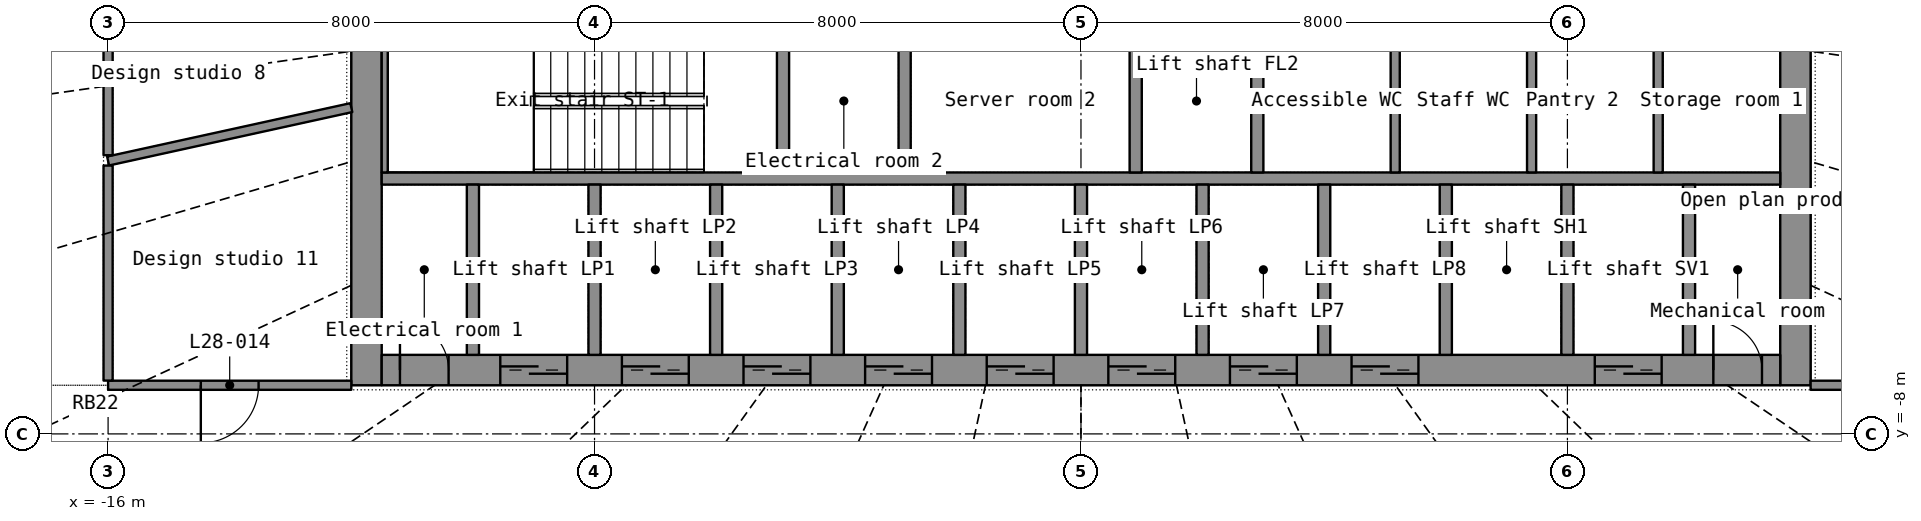
"""IFC4 building model, lengths in metres.
Left out: names, types, materials, properties, quantities, classifications, styles, units other than length and angle.
Written with IfcOpenShell. Run it as: python <this file> out.ifc"""

import sys

from ifc_helpers import new_model, si_unit, direction, frame, frame_2d, origin, place, context, subcontext, project, spatial, rectangle, extrude, element, fill, save


model = new_model("IFC4")
c1 = context("Model", 3, precision=1e-05, world=origin(), true_north=direction((0.0, 1.0)))
c2 = subcontext(c1, "Body", "Model", "MODEL_VIEW")
j1 = project(units=[si_unit("LENGTHUNIT", "METRE"), si_unit("PLANEANGLEUNIT", "RADIAN")], contexts=[c1])
p1 = place(None, origin())
s1 = spatial("IfcSite", under=j1, at=p1, CompositionType="ELEMENT")
p2 = place(p1, origin())
s2 = spatial("IfcBuilding", under=s1, at=p2, CompositionType="ELEMENT")
p3 = place(p2, frame((0.0, 0.0, 119.3)))
s3 = spatial("IfcBuildingStorey", under=s2, at=p3, CompositionType="ELEMENT", Elevation=119.3)
p4 = place(p3, frame((-11.75, -7.2, 0.0), z_axis=(0.0, 0.0, 1.0), x_axis=(0.0, 1.0, 0.0)))
e1 = element("IfcWall", 1, at=p4, inside=s3, PredefinedType="SHEAR", context=c2, shape_type="SweptSolid", body=[
    extrude(rectangle(XDim=14.4, YDim=0.5, at=frame_2d((7.2, 0.0))), origin(), (0.0, 0.0, 1.0), 3.3),
])
p5 = place(p4, frame((6.5, 0.0, 0.0)))
e2 = element("IfcOpeningElement", 2, at=p5, cuts=e1, PredefinedType="OPENING", context=c2, shape_type="SweptSolid", body=[
    extrude(rectangle(XDim=1.4, YDim=2.2, at=frame_2d((0.7, 1.1))), frame((0.0, 0.26, 0.0), z_axis=(0.0, -1.0, 0.0), x_axis=(1.0, 0.0, 0.0)), (0.0, 0.0, 1.0), 0.52),
])
p6 = place(p3, frame((11.75, -7.2, 0.0), z_axis=(0.0, 0.0, 1.0), x_axis=(0.0, 1.0, 0.0)))
e3 = element("IfcWall", 3, at=p6, inside=s3, PredefinedType="SHEAR", context=c2, shape_type="SweptSolid", body=[
    extrude(rectangle(XDim=14.4, YDim=0.5, at=frame_2d((7.2, 0.0))), origin(), (0.0, 0.0, 1.0), 3.3),
])
p7 = place(p6, frame((6.5, 0.0, 0.0)))
e4 = element("IfcOpeningElement", 4, at=p7, cuts=e3, PredefinedType="OPENING", context=c2, shape_type="SweptSolid", body=[
    extrude(rectangle(XDim=1.4, YDim=2.2, at=frame_2d((0.7, 1.1))), frame((0.0, 0.26, 0.0), z_axis=(0.0, -1.0, 0.0), x_axis=(1.0, 0.0, 0.0)), (0.0, 0.0, 1.0), 0.52),
])
p8 = place(p3, frame((-11.5, -6.95, 0.0), z_axis=(0.0, 0.0, 1.0), x_axis=(1.0, 0.0, 0.0)))
e5 = element("IfcWall", 5, at=p8, inside=s3, PredefinedType="SHEAR", context=c2, shape_type="SweptSolid", body=[
    extrude(rectangle(XDim=23.0, YDim=0.5, at=frame_2d((11.5, 0.0))), origin(), (0.0, 0.0, 1.0), 3.3),
])
p9 = place(p8, frame((1.95, 0.0, 0.0)))
e6 = element("IfcOpeningElement", 6, at=p9, cuts=e5, PredefinedType="OPENING", context=c2, shape_type="SweptSolid", body=[
    extrude(rectangle(XDim=1.1, YDim=2.2, at=frame_2d((0.55, 1.1))), frame((0.0, 0.26, 0.0), z_axis=(0.0, -1.0, 0.0), x_axis=(1.0, 0.0, 0.0)), (0.0, 0.0, 1.0), 0.52),
])
p10 = place(p8, frame((3.95, 0.0, 0.0)))
e7 = element("IfcOpeningElement", 7, at=p10, cuts=e5, PredefinedType="OPENING", context=c2, shape_type="SweptSolid", body=[
    extrude(rectangle(XDim=1.1, YDim=2.2, at=frame_2d((0.55, 1.1))), frame((0.0, 0.26, 0.0), z_axis=(0.0, -1.0, 0.0), x_axis=(1.0, 0.0, 0.0)), (0.0, 0.0, 1.0), 0.52),
])
p11 = place(p8, frame((5.95, 0.0, 0.0)))
e8 = element("IfcOpeningElement", 8, at=p11, cuts=e5, PredefinedType="OPENING", context=c2, shape_type="SweptSolid", body=[
    extrude(rectangle(XDim=1.1, YDim=2.2, at=frame_2d((0.55, 1.1))), frame((0.0, 0.26, 0.0), z_axis=(0.0, -1.0, 0.0), x_axis=(1.0, 0.0, 0.0)), (0.0, 0.0, 1.0), 0.52),
])
p12 = place(p8, frame((7.95, 0.0, 0.0)))
e9 = element("IfcOpeningElement", 9, at=p12, cuts=e5, PredefinedType="OPENING", context=c2, shape_type="SweptSolid", body=[
    extrude(rectangle(XDim=1.1, YDim=2.2, at=frame_2d((0.55, 1.1))), frame((0.0, 0.26, 0.0), z_axis=(0.0, -1.0, 0.0), x_axis=(1.0, 0.0, 0.0)), (0.0, 0.0, 1.0), 0.52),
])
p13 = place(p8, frame((9.95, 0.0, 0.0)))
e10 = element("IfcOpeningElement", 10, at=p13, cuts=e5, PredefinedType="OPENING", context=c2, shape_type="SweptSolid", body=[
    extrude(rectangle(XDim=1.1, YDim=2.2, at=frame_2d((0.55, 1.1))), frame((0.0, 0.26, 0.0), z_axis=(0.0, -1.0, 0.0), x_axis=(1.0, 0.0, 0.0)), (0.0, 0.0, 1.0), 0.52),
])
p14 = place(p8, frame((11.95, 0.0, 0.0)))
e11 = element("IfcOpeningElement", 11, at=p14, cuts=e5, PredefinedType="OPENING", context=c2, shape_type="SweptSolid", body=[
    extrude(rectangle(XDim=1.1, YDim=2.2, at=frame_2d((0.55, 1.1))), frame((0.0, 0.26, 0.0), z_axis=(0.0, -1.0, 0.0), x_axis=(1.0, 0.0, 0.0)), (0.0, 0.0, 1.0), 0.52),
])
p15 = place(p8, frame((13.95, 0.0, 0.0)))
e12 = element("IfcOpeningElement", 12, at=p15, cuts=e5, PredefinedType="OPENING", context=c2, shape_type="SweptSolid", body=[
    extrude(rectangle(XDim=1.1, YDim=2.2, at=frame_2d((0.55, 1.1))), frame((0.0, 0.26, 0.0), z_axis=(0.0, -1.0, 0.0), x_axis=(1.0, 0.0, 0.0)), (0.0, 0.0, 1.0), 0.52),
])
p16 = place(p8, frame((15.95, 0.0, 0.0)))
e13 = element("IfcOpeningElement", 13, at=p16, cuts=e5, PredefinedType="OPENING", context=c2, shape_type="SweptSolid", body=[
    extrude(rectangle(XDim=1.1, YDim=2.2, at=frame_2d((0.55, 1.1))), frame((0.0, 0.26, 0.0), z_axis=(0.0, -1.0, 0.0), x_axis=(1.0, 0.0, 0.0)), (0.0, 0.0, 1.0), 0.52),
])
p17 = place(p8, frame((19.95, 0.0, 0.0)))
e14 = element("IfcOpeningElement", 14, at=p17, cuts=e5, PredefinedType="OPENING", context=c2, shape_type="SweptSolid", body=[
    extrude(rectangle(XDim=1.1, YDim=2.2, at=frame_2d((0.55, 1.1))), frame((0.0, 0.26, 0.0), z_axis=(0.0, -1.0, 0.0), x_axis=(1.0, 0.0, 0.0)), (0.0, 0.0, 1.0), 0.52),
])
p18 = place(p8, frame((0.3, 0.0, 0.0)))
e15 = element("IfcOpeningElement", 15, at=p18, cuts=e5, PredefinedType="OPENING", context=c2, shape_type="SweptSolid", body=[
    extrude(rectangle(XDim=0.8, YDim=2.05, at=frame_2d((0.4, 1.025))), frame((0.0, 0.26, 0.0), z_axis=(0.0, -1.0, 0.0), x_axis=(1.0, 0.0, 0.0)), (0.0, 0.0, 1.0), 0.52),
])
p19 = place(p8, frame((21.9, 0.0, 0.0)))
e16 = element("IfcOpeningElement", 16, at=p19, cuts=e5, PredefinedType="OPENING", context=c2, shape_type="SweptSolid", body=[
    extrude(rectangle(XDim=0.8, YDim=2.05, at=frame_2d((0.4, 1.025))), frame((0.0, 0.26, 0.0), z_axis=(0.0, -1.0, 0.0), x_axis=(1.0, 0.0, 0.0)), (0.0, 0.0, 1.0), 0.52),
])
p20 = place(p3, frame((-11.5, -3.8, 0.0), z_axis=(0.0, 0.0, 1.0), x_axis=(1.0, 0.0, 0.0)))
e17 = element("IfcWall", 17, at=p20, inside=s3, PredefinedType="SHEAR", context=c2, shape_type="SweptSolid", body=[
    extrude(rectangle(XDim=23.0, YDim=0.2, at=frame_2d((11.5, 0.0))), origin(), (0.0, 0.0, 1.0), 3.3),
])
for number, where, z_axis, x_axis in (
    (18, (-10.0, -6.7, 0.0), (0.0, 0.0, 1.0), (0.0, 1.0, 0.0)),
    (19, (-8.0, -6.7, 0.0), (0.0, 0.0, 1.0), (0.0, 1.0, 0.0)),
    (20, (-6.0, -6.7, 0.0), (0.0, 0.0, 1.0), (0.0, 1.0, 0.0)),
    (21, (-4.0, -6.7, 0.0), (0.0, 0.0, 1.0), (0.0, 1.0, 0.0)),
    (22, (-2.0, -6.7, 0.0), (0.0, 0.0, 1.0), (0.0, 1.0, 0.0)),
    (23, (0.0, -6.7, 0.0), (0.0, 0.0, 1.0), (0.0, 1.0, 0.0)),
    (24, (2.0, -6.7, 0.0), (0.0, 0.0, 1.0), (0.0, 1.0, 0.0)),
    (25, (4.0, -6.7, 0.0), (0.0, 0.0, 1.0), (0.0, 1.0, 0.0)),
    (26, (6.0, -6.7, 0.0), (0.0, 0.0, 1.0), (0.0, 1.0, 0.0)),
    (27, (8.0, -6.7, 0.0), (0.0, 0.0, 1.0), (0.0, 1.0, 0.0)),
    (28, (10.0, -6.7, 0.0), (0.0, 0.0, 1.0), (0.0, 1.0, 0.0)),
):
    element("IfcWall", number, at=place(p3, frame(where, z_axis=z_axis, x_axis=x_axis)), inside=s3, PredefinedType="SHEAR", context=c2, shape_type="SweptSolid", body=[
        extrude(rectangle(XDim=2.8, YDim=0.2, at=frame_2d((1.4, 0.0))), origin(), (0.0, 0.0, 1.0), 3.3),
    ])
p21 = place(p3, frame((-2.9, -3.7, 0.0), z_axis=(0.0, 0.0, 1.0), x_axis=(0.0, 1.0, 0.0)))
e29 = element("IfcWall", 29, at=p21, inside=s3, PredefinedType="SHEAR", context=c2, shape_type="SweptSolid", body=[
    extrude(rectangle(XDim=7.4, YDim=0.2, at=frame_2d((3.7, 0.0))), origin(), (0.0, 0.0, 1.0), 3.3),
])
p22 = place(p21, frame((3.1, 0.0, 0.0)))
e30 = element("IfcOpeningElement", 30, at=p22, cuts=e29, PredefinedType="OPENING", context=c2, shape_type="SweptSolid", body=[
    extrude(rectangle(XDim=1.2, YDim=2.2, at=frame_2d((0.6, 1.1))), frame((0.0, 0.11, 0.0), z_axis=(0.0, -1.0, 0.0), x_axis=(1.0, 0.0, 0.0)), (0.0, 0.0, 1.0), 0.22),
])
p23 = place(p3, frame((2.9, -3.7, 0.0), z_axis=(0.0, 0.0, 1.0), x_axis=(0.0, 1.0, 0.0)))
e31 = element("IfcWall", 31, at=p23, inside=s3, PredefinedType="SHEAR", context=c2, shape_type="SweptSolid", body=[
    extrude(rectangle(XDim=7.4, YDim=0.2, at=frame_2d((3.7, 0.0))), origin(), (0.0, 0.0, 1.0), 3.3),
])
p24 = place(p23, frame((3.1, 0.0, 0.0)))
e32 = element("IfcOpeningElement", 32, at=p24, cuts=e31, PredefinedType="OPENING", context=c2, shape_type="SweptSolid", body=[
    extrude(rectangle(XDim=1.2, YDim=2.2, at=frame_2d((0.6, 1.1))), frame((0.0, 0.11, 0.0), z_axis=(0.0, -1.0, 0.0), x_axis=(1.0, 0.0, 0.0)), (0.0, 0.0, 1.0), 0.22),
])
p25 = place(p3, frame((0.9, -3.7, 0.0), z_axis=(0.0, 0.0, 1.0), x_axis=(0.0, 1.0, 0.0)))
e33 = element("IfcWall", 33, at=p25, inside=s3, PredefinedType="SHEAR", context=c2, shape_type="SweptSolid", body=[
    extrude(rectangle(XDim=2.35, YDim=0.2, at=frame_2d((1.175, 0.0))), origin(), (0.0, 0.0, 1.0), 3.3),
])
p26 = place(p3, frame((-11.45, -3.7, 0.0), z_axis=(0.0, 0.0, 1.0), x_axis=(0.0, 1.0, 0.0)))
e34 = element("IfcWall", 34, at=p26, inside=s3, PredefinedType="SHEAR", context=c2, shape_type="SweptSolid", body=[
    extrude(rectangle(XDim=2.35, YDim=0.1, at=frame_2d((1.175, 0.0))), origin(), (0.0, 0.0, 1.0), 3.3),
])
p27 = place(p3, frame((-4.9, -3.7, 0.0), z_axis=(0.0, 0.0, 1.0), x_axis=(0.0, 1.0, 0.0)))
e35 = element("IfcWall", 35, at=p27, inside=s3, PredefinedType="SHEAR", context=c2, shape_type="SweptSolid", body=[
    extrude(rectangle(XDim=2.35, YDim=0.2, at=frame_2d((1.175, 0.0))), origin(), (0.0, 0.0, 1.0), 3.3),
])
for number, where, z_axis, x_axis in (
    (36, (5.168, -3.7, 0.0), (0.0, 0.0, 1.0), (0.0, 1.0, 0.0)),
    (37, (7.411, -3.7, 0.0), (0.0, 0.0, 1.0), (0.0, 1.0, 0.0)),
    (38, (9.493, -3.7, 0.0), (0.0, 0.0, 1.0), (0.0, 1.0, 0.0)),
):
    element("IfcWall", number, at=place(p3, frame(where, z_axis=z_axis, x_axis=x_axis)), inside=s3, PredefinedType="PARTITIONING", context=c2, shape_type="SweptSolid", body=[
        extrude(rectangle(XDim=2.35, YDim=0.15, at=frame_2d((1.175, 0.0))), origin(), (0.0, 0.0, 1.0), 3.3),
    ])
p28 = place(p3, frame((-16.0, -3.512, 0.0), z_axis=(0.0, 0.0, 1.0), x_axis=(0.976750433, 0.214379551, 0.0)))
e39 = element("IfcWall", 39, at=p28, inside=s3, PredefinedType="PARTITIONING", context=c2, shape_type="SweptSolid", body=[
    extrude(rectangle(XDim=4.095, YDim=0.15, at=frame_2d((2.048, 0.0))), origin(), (0.0, 0.0, 1.0), 2.4),
])
p29 = place(p3, frame((-12.0, -7.2, 0.0), z_axis=(0.0, 0.0, 1.0), x_axis=(-1.0, 0.0, 0.0)))
e40 = element("IfcWall", 40, at=p29, inside=s3, PredefinedType="PARTITIONING", context=c2, shape_type="SweptSolid", body=[
    extrude(rectangle(XDim=4.0, YDim=0.15, at=frame_2d((2.0, 0.0))), origin(), (0.0, 0.0, 1.0), 2.4),
])
p30 = place(p29, frame((1.525, 0.0, 0.0)))
e41 = element("IfcOpeningElement", 41, at=p30, cuts=e40, PredefinedType="OPENING", context=c2, shape_type="SweptSolid", body=[
    extrude(rectangle(XDim=0.95, YDim=2.15, at=frame_2d((0.475, 1.075))), frame((0.0, 0.085, 0.0), z_axis=(0.0, -1.0, 0.0), x_axis=(1.0, 0.0, 0.0)), (0.0, 0.0, 1.0), 0.17),
])
p31 = place(p3, frame((15.923, -7.2, 0.0), z_axis=(0.0, 0.0, 1.0), x_axis=(-1.0, 0.0, 0.0)))
e42 = element("IfcWall", 42, at=p31, inside=s3, PredefinedType="PARTITIONING", context=c2, shape_type="SweptSolid", body=[
    extrude(rectangle(XDim=3.923, YDim=0.15, at=frame_2d((1.961, 0.0))), origin(), (0.0, 0.0, 1.0), 2.4),
])
p32 = place(p3, frame((-16.0, -7.123, 0.0), z_axis=(0.0, 0.0, 1.0), x_axis=(0.0, 1.0, 0.0)))
e43 = element("IfcWall", 43, at=p32, inside=s3, PredefinedType="PARTITIONING", context=c2, shape_type="SweptSolid", body=[
    extrude(rectangle(XDim=3.536, YDim=0.15, at=frame_2d((1.768, 0.0))), origin(), (0.0, 0.0, 1.0), 2.4),
])
p33 = place(p3, frame((-16.0, -3.417, 0.0), z_axis=(0.0, 0.0, 1.0), x_axis=(0.0, 1.0, 0.0)))
e44 = element("IfcWall", 44, at=p33, inside=s3, PredefinedType="PARTITIONING", context=c2, shape_type="SweptSolid", body=[
    extrude(rectangle(XDim=2.439, YDim=0.15, at=frame_2d((1.22, 0.0))), origin(), (0.0, 0.0, 1.0), 2.4),
])
p34 = place(p9, origin())
e45 = element("IfcDoor", 45, at=p34, inside=s3, OperationType="DOUBLE_DOOR_SLIDING", PredefinedType="DOOR", context=c2, shape_type="SweptSolid", body=[
    extrude(rectangle(XDim=1.1, YDim=2.2, at=frame_2d((0.55, 1.1))), frame((0.0, 0.025, 0.0), z_axis=(0.0, -1.0, 0.0), x_axis=(1.0, 0.0, 0.0)), (0.0, 0.0, 1.0), 0.05),
])
fill(e6, e45)
p35 = place(p10, origin())
e46 = element("IfcDoor", 46, at=p35, inside=s3, OperationType="DOUBLE_DOOR_SLIDING", PredefinedType="DOOR", context=c2, shape_type="SweptSolid", body=[
    extrude(rectangle(XDim=1.1, YDim=2.2, at=frame_2d((0.55, 1.1))), frame((0.0, 0.025, 0.0), z_axis=(0.0, -1.0, 0.0), x_axis=(1.0, 0.0, 0.0)), (0.0, 0.0, 1.0), 0.05),
])
fill(e7, e46)
p36 = place(p11, origin())
e47 = element("IfcDoor", 47, at=p36, inside=s3, OperationType="DOUBLE_DOOR_SLIDING", PredefinedType="DOOR", context=c2, shape_type="SweptSolid", body=[
    extrude(rectangle(XDim=1.1, YDim=2.2, at=frame_2d((0.55, 1.1))), frame((0.0, 0.025, 0.0), z_axis=(0.0, -1.0, 0.0), x_axis=(1.0, 0.0, 0.0)), (0.0, 0.0, 1.0), 0.05),
])
fill(e8, e47)
p37 = place(p12, origin())
e48 = element("IfcDoor", 48, at=p37, inside=s3, OperationType="DOUBLE_DOOR_SLIDING", PredefinedType="DOOR", context=c2, shape_type="SweptSolid", body=[
    extrude(rectangle(XDim=1.1, YDim=2.2, at=frame_2d((0.55, 1.1))), frame((0.0, 0.025, 0.0), z_axis=(0.0, -1.0, 0.0), x_axis=(1.0, 0.0, 0.0)), (0.0, 0.0, 1.0), 0.05),
])
fill(e9, e48)
p38 = place(p13, origin())
e49 = element("IfcDoor", 49, at=p38, inside=s3, OperationType="DOUBLE_DOOR_SLIDING", PredefinedType="DOOR", context=c2, shape_type="SweptSolid", body=[
    extrude(rectangle(XDim=1.1, YDim=2.2, at=frame_2d((0.55, 1.1))), frame((0.0, 0.025, 0.0), z_axis=(0.0, -1.0, 0.0), x_axis=(1.0, 0.0, 0.0)), (0.0, 0.0, 1.0), 0.05),
])
fill(e10, e49)
p39 = place(p14, origin())
e50 = element("IfcDoor", 50, at=p39, inside=s3, OperationType="DOUBLE_DOOR_SLIDING", PredefinedType="DOOR", context=c2, shape_type="SweptSolid", body=[
    extrude(rectangle(XDim=1.1, YDim=2.2, at=frame_2d((0.55, 1.1))), frame((0.0, 0.025, 0.0), z_axis=(0.0, -1.0, 0.0), x_axis=(1.0, 0.0, 0.0)), (0.0, 0.0, 1.0), 0.05),
])
fill(e11, e50)
p40 = place(p15, origin())
e51 = element("IfcDoor", 51, at=p40, inside=s3, OperationType="DOUBLE_DOOR_SLIDING", PredefinedType="DOOR", context=c2, shape_type="SweptSolid", body=[
    extrude(rectangle(XDim=1.1, YDim=2.2, at=frame_2d((0.55, 1.1))), frame((0.0, 0.025, 0.0), z_axis=(0.0, -1.0, 0.0), x_axis=(1.0, 0.0, 0.0)), (0.0, 0.0, 1.0), 0.05),
])
fill(e12, e51)
p41 = place(p16, origin())
e52 = element("IfcDoor", 52, at=p41, inside=s3, OperationType="DOUBLE_DOOR_SLIDING", PredefinedType="DOOR", context=c2, shape_type="SweptSolid", body=[
    extrude(rectangle(XDim=1.1, YDim=2.2, at=frame_2d((0.55, 1.1))), frame((0.0, 0.025, 0.0), z_axis=(0.0, -1.0, 0.0), x_axis=(1.0, 0.0, 0.0)), (0.0, 0.0, 1.0), 0.05),
])
fill(e13, e52)
p42 = place(p17, origin())
e53 = element("IfcDoor", 53, at=p42, inside=s3, OperationType="DOUBLE_DOOR_SLIDING", PredefinedType="DOOR", context=c2, shape_type="SweptSolid", body=[
    extrude(rectangle(XDim=1.1, YDim=2.2, at=frame_2d((0.55, 1.1))), frame((0.0, 0.025, 0.0), z_axis=(0.0, -1.0, 0.0), x_axis=(1.0, 0.0, 0.0)), (0.0, 0.0, 1.0), 0.05),
])
fill(e14, e53)
p43 = place(p18, origin())
e54 = element("IfcDoor", 54, at=p43, inside=s3, OperationType="SINGLE_SWING_LEFT", PredefinedType="DOOR", context=c2, shape_type="SweptSolid", body=[
    extrude(rectangle(XDim=0.8, YDim=2.05, at=frame_2d((0.4, 1.025))), frame((0.0, 0.025, 0.0), z_axis=(0.0, -1.0, 0.0), x_axis=(1.0, 0.0, 0.0)), (0.0, 0.0, 1.0), 0.05),
])
fill(e15, e54)
p44 = place(p19, origin())
e55 = element("IfcDoor", 55, at=p44, inside=s3, OperationType="SINGLE_SWING_LEFT", PredefinedType="DOOR", context=c2, shape_type="SweptSolid", body=[
    extrude(rectangle(XDim=0.8, YDim=2.05, at=frame_2d((0.4, 1.025))), frame((0.0, 0.025, 0.0), z_axis=(0.0, -1.0, 0.0), x_axis=(1.0, 0.0, 0.0)), (0.0, 0.0, 1.0), 0.05),
])
fill(e16, e55)
p45 = place(p30, origin())
e56 = element("IfcDoor", 56, at=p45, inside=s3, OperationType="SINGLE_SWING_RIGHT", PredefinedType="DOOR", context=c2, shape_type="SweptSolid", body=[
    extrude(rectangle(XDim=0.95, YDim=2.15, at=frame_2d((0.475, 1.075))), frame((0.0, 0.025, 0.0), z_axis=(0.0, -1.0, 0.0), x_axis=(1.0, 0.0, 0.0)), (0.0, 0.0, 1.0), 0.05),
])
fill(e41, e56)
save(model, sys.argv[1])
